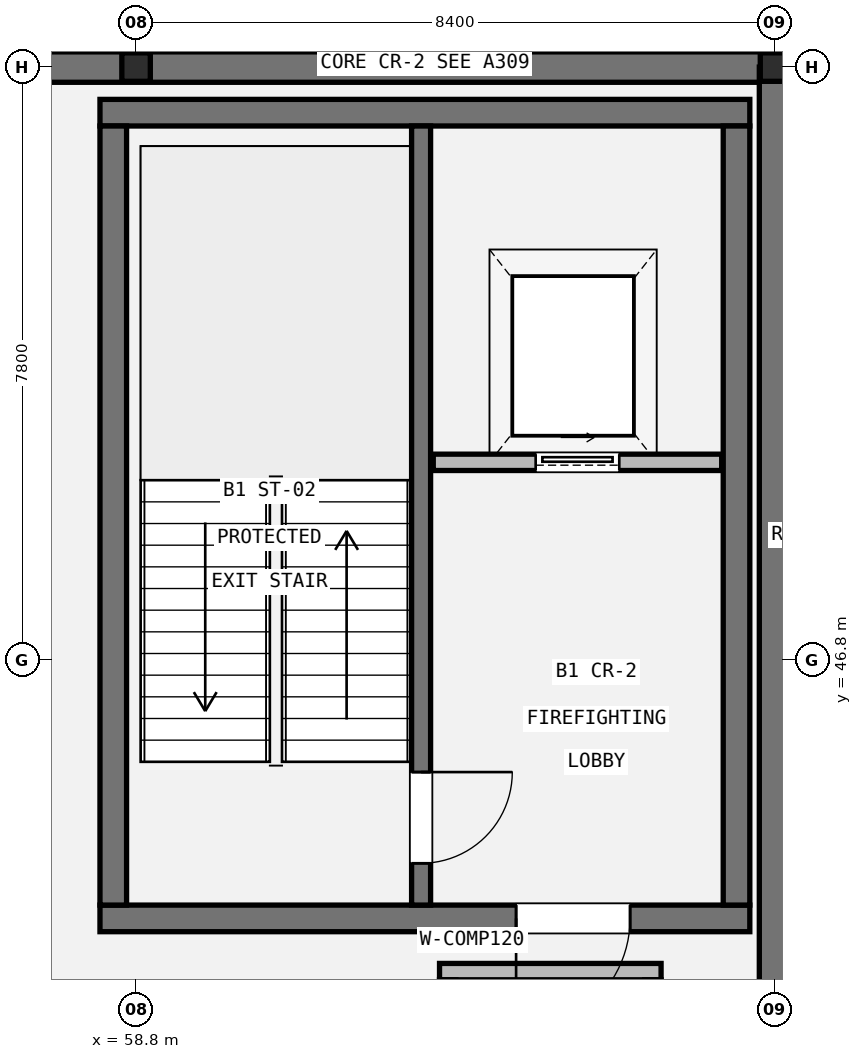
"""IFC4 building model, lengths in metres.
Left out: names, types, materials, properties, quantities, classifications, styles, units other than length and angle.
Written with IfcOpenShell. Run it as: python <this file> out.ifc"""

import sys

from ifc_helpers import new_model, si_unit, direction, frame, frame_2d, origin, origin_2d, place, context, subcontext, project, spatial, rectangle, i_section, extrude, element, fill, save


model = new_model("IFC4")
c1 = context("Model", 3, precision=1e-05, world=origin(), true_north=direction((0.0, 1.0)))
c2 = subcontext(c1, "Body", "Model", "MODEL_VIEW")
j1 = project(units=[si_unit("LENGTHUNIT", "METRE"), si_unit("PLANEANGLEUNIT", "RADIAN")], contexts=[c1])
p1 = place(None, origin())
s1 = spatial("IfcSite", under=j1, at=p1, CompositionType="ELEMENT")
p2 = place(p1, origin())
s2 = spatial("IfcBuilding", under=s1, at=p2, CompositionType="ELEMENT")
p3 = place(p2, frame((0.0, 0.0, -4.5)))
s3 = spatial("IfcBuildingStorey", under=s2, at=p3, CompositionType="ELEMENT", Elevation=-4.5)
for number, where, z_axis, x_axis in (
    (1, (58.8, 54.6, 0.0), (0.0, 0.0, 1.0), (1.0, 0.0, 0.0)),
    (2, (67.2, 54.6, 0.0), (0.0, 0.0, 1.0), (1.0, 0.0, 0.0)),
):
    element("IfcColumn", number, at=place(p3, frame(where, z_axis=z_axis, x_axis=x_axis)), inside=s3, PredefinedType="COLUMN", context=c2, shape_type="SweptSolid", body=[
        extrude(i_section(OverallWidth=0.375, OverallDepth=0.375, WebThickness=0.017, FlangeThickness=0.027, FilletRadius=0.015, at=origin_2d()), origin(), (0.0, 0.0, 1.0), 4.5),
    ])
p4 = place(p3, frame((33.6, 54.6, 0.0), z_axis=(0.0, 0.0, 1.0), x_axis=(1.0, 0.0, 0.0)))
e3 = element("IfcWall", 3, at=p4, inside=s3, PredefinedType="USERDEFINED", context=c2, shape_type="SweptSolid", body=[
    extrude(rectangle(XDim=33.6, YDim=0.4, at=frame_2d((16.8, 0.0))), origin(), (0.0, 0.0, 1.0), 4.24),
])
p5 = place(p3, frame((67.2, 54.6, 0.0), z_axis=(0.0, 0.0, 1.0), x_axis=(0.0, -1.0, 0.0)))
e4 = element("IfcWall", 4, at=p5, inside=s3, PredefinedType="USERDEFINED", context=c2, shape_type="SweptSolid", body=[
    extrude(rectangle(XDim=12.3, YDim=0.4, at=frame_2d((6.15, 0.0))), origin(), (0.0, 0.0, 1.0), 4.24),
])
p6 = place(p3, frame((66.875, 43.4, 0.0), z_axis=(0.0, 0.0, 1.0), x_axis=(-1.0, 0.0, 0.0)))
e5 = element("IfcWall", 5, at=p6, inside=s3, PredefinedType="SHEAR", context=c2, shape_type="SweptSolid", body=[
    extrude(rectangle(XDim=8.55, YDim=0.35, at=frame_2d((4.275, 0.0))), origin(), (0.0, 0.0, 1.0), 4.25),
])
p7 = place(p6, frame((1.575, 0.0, 0.0)))
e6 = element("IfcOpeningElement", 6, at=p7, cuts=e5, PredefinedType="OPENING", context=c2, shape_type="SweptSolid", body=[
    extrude(rectangle(XDim=1.5, YDim=2.15, at=frame_2d((0.75, 1.075))), frame((0.0, 0.185, 0.0), z_axis=(0.0, -1.0, 0.0), x_axis=(1.0, 0.0, 0.0)), (0.0, 0.0, 1.0), 0.37),
])
p8 = place(p3, frame((58.325, 54.0, 0.0), z_axis=(0.0, 0.0, 1.0), x_axis=(1.0, 0.0, 0.0)))
e7 = element("IfcWall", 7, at=p8, inside=s3, PredefinedType="SHEAR", context=c2, shape_type="SweptSolid", body=[
    extrude(rectangle(XDim=8.55, YDim=0.35, at=frame_2d((4.275, 0.0))), origin(), (0.0, 0.0, 1.0), 4.25),
])
for number, where, z_axis, x_axis in (
    (8, (58.5, 43.575, 0.0), (0.0, 0.0, 1.0), (0.0, 1.0, 0.0)),
    (9, (66.7, 53.825, 0.0), (0.0, 0.0, 1.0), (0.0, -1.0, 0.0)),
):
    element("IfcWall", number, at=place(p3, frame(where, z_axis=z_axis, x_axis=x_axis)), inside=s3, PredefinedType="SHEAR", context=c2, shape_type="SweptSolid", body=[
        extrude(rectangle(XDim=10.25, YDim=0.35, at=frame_2d((5.125, 0.0))), origin(), (0.0, 0.0, 1.0), 4.25),
    ])
p9 = place(p3, frame((62.55, 53.825, 0.0), z_axis=(0.0, 0.0, 1.0), x_axis=(0.0, -1.0, 0.0)))
e10 = element("IfcWall", 10, at=p9, inside=s3, PredefinedType="SHEAR", context=c2, shape_type="SweptSolid", body=[
    extrude(rectangle(XDim=10.25, YDim=0.25, at=frame_2d((5.125, 0.0))), origin(), (0.0, 0.0, 1.0), 4.25),
])
p10 = place(p9, frame((8.5, 0.0, 0.0)))
e11 = element("IfcOpeningElement", 11, at=p10, cuts=e10, PredefinedType="OPENING", context=c2, shape_type="SweptSolid", body=[
    extrude(rectangle(XDim=1.2, YDim=2.15, at=frame_2d((0.6, 1.075))), frame((0.0, 0.135, 0.0), z_axis=(0.0, -1.0, 0.0), x_axis=(1.0, 0.0, 0.0)), (0.0, 0.0, 1.0), 0.27),
])
p11 = place(p3, frame((62.71, 49.4, 0.0), z_axis=(0.0, 0.0, 1.0), x_axis=(1.0, 0.0, 0.0)))
e12 = element("IfcWall", 12, at=p11, inside=s3, PredefinedType="STANDARD", context=c2, shape_type="SweptSolid", body=[
    extrude(rectangle(XDim=3.795, YDim=0.215, at=frame_2d((1.897, 0.0))), origin(), (0.0, 0.0, 1.0), 4.242),
])
p12 = place(p11, frame((1.347, 0.0, 0.0)))
e13 = element("IfcOpeningElement", 13, at=p12, cuts=e12, PredefinedType="OPENING", context=c2, shape_type="SweptSolid", body=[
    extrude(rectangle(XDim=1.1, YDim=2.2, at=frame_2d((0.55, 1.1))), frame((0.0, 0.117, 0.0), z_axis=(0.0, -1.0, 0.0), x_axis=(1.0, 0.0, 0.0)), (0.0, 0.0, 1.0), 0.235),
])
p13 = place(p3, frame((62.792, 42.7, 0.0), z_axis=(0.0, 0.0, 1.0), x_axis=(1.0, 0.0, 0.0)))
e14 = element("IfcWall", 14, at=p13, inside=s3, PredefinedType="STANDARD", context=c2, shape_type="SweptSolid", body=[
    extrude(rectangle(XDim=2.915, YDim=0.215, at=frame_2d((1.458, 0.0))), origin(), (0.0, 0.0, 1.0), 4.242),
])
p14 = place(p10, origin())
e15 = element("IfcDoor", 15, at=p14, inside=s3, OperationType="SINGLE_SWING_LEFT", PredefinedType="DOOR", context=c2, shape_type="SweptSolid", body=[
    extrude(rectangle(XDim=1.2, YDim=2.15, at=frame_2d((0.6, 1.075))), frame((0.0, 0.025, 0.0), z_axis=(0.0, -1.0, 0.0), x_axis=(1.0, 0.0, 0.0)), (0.0, 0.0, 1.0), 0.05),
])
fill(e11, e15)
p15 = place(p7, origin())
e16 = element("IfcDoor", 16, at=p15, inside=s3, OperationType="SINGLE_SWING_RIGHT", PredefinedType="DOOR", context=c2, shape_type="SweptSolid", body=[
    extrude(rectangle(XDim=1.5, YDim=2.15, at=frame_2d((0.75, 1.075))), frame((0.0, 0.025, 0.0), z_axis=(0.0, -1.0, 0.0), x_axis=(1.0, 0.0, 0.0)), (0.0, 0.0, 1.0), 0.05),
])
fill(e6, e16)
p16 = place(p12, origin())
e17 = element("IfcDoor", 17, at=p16, inside=s3, OperationType="SLIDING_TO_RIGHT", PredefinedType="DOOR", context=c2, shape_type="SweptSolid", body=[
    extrude(rectangle(XDim=1.1, YDim=2.2, at=frame_2d((0.55, 1.1))), frame((0.0, 0.025, 0.0), z_axis=(0.0, -1.0, 0.0), x_axis=(1.0, 0.0, 0.0)), (0.0, 0.0, 1.0), 0.05),
])
fill(e13, e17)
save(model, sys.argv[1])
